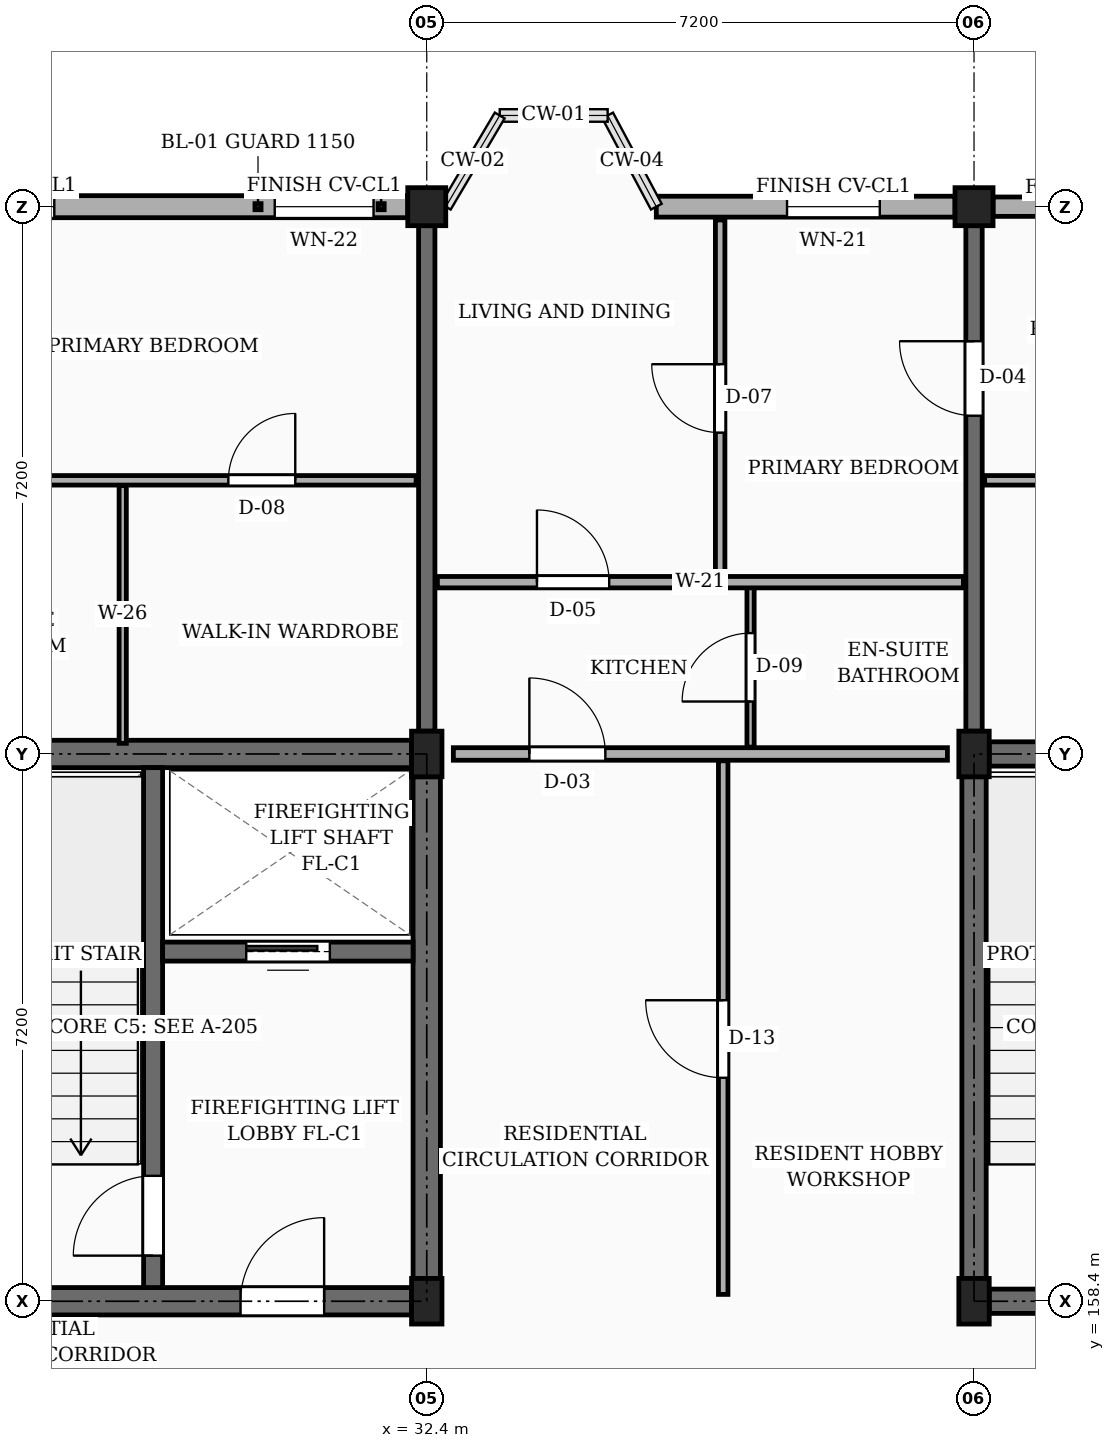
"""IFC4 building model, lengths in metres.
Left out: names, types, materials, properties, quantities, classifications, styles, units other than length and angle.
Written with IfcOpenShell. Run it as: python <this file> out.ifc"""

import sys

from ifc_helpers import new_model, si_unit, direction, frame, frame_2d, origin, origin_2d, place, context, subcontext, project, spatial, rectangle, extrude, element, fill, save


model = new_model("IFC4")
c1 = context("Model", 3, precision=1e-05, world=origin(), true_north=direction((0.0, 1.0)))
c2 = subcontext(c1, "Body", "Model", "MODEL_VIEW")
j1 = project(units=[si_unit("LENGTHUNIT", "METRE"), si_unit("PLANEANGLEUNIT", "RADIAN")], contexts=[c1])
p1 = place(None, origin())
s1 = spatial("IfcSite", under=j1, at=p1, CompositionType="ELEMENT")
p2 = place(p1, origin())
s2 = spatial("IfcBuilding", under=s1, at=p2, CompositionType="ELEMENT")
p3 = place(p2, frame((0.0, 0.0, 26.55)))
s3 = spatial("IfcBuildingStorey", under=s2, at=p3, CompositionType="ELEMENT", Elevation=26.55)
for number, where, z_axis, x_axis in (
    (1, (32.4, 158.4, 0.0), (0.0, 0.0, 1.0), (1.0, 0.0, 0.0)),
    (2, (32.4, 165.6, 0.0), (0.0, 0.0, 1.0), (1.0, 0.0, 0.0)),
):
    element("IfcColumn", number, at=place(p3, frame(where, z_axis=z_axis, x_axis=x_axis)), inside=s3, PredefinedType="COLUMN", context=c2, shape_type="SweptSolid", body=[
        extrude(rectangle(XDim=0.4, YDim=0.6, at=origin_2d()), origin(), (0.0, 0.0, 1.0), 3.15),
    ])
p4 = place(p3, frame((32.4, 172.8, 0.0), z_axis=(0.0, 0.0, 1.0), x_axis=(1.0, 0.0, 0.0)))
e3 = element("IfcColumn", 3, at=p4, inside=s3, PredefinedType="COLUMN", context=c2, shape_type="SweptSolid", body=[
    extrude(rectangle(XDim=0.5, YDim=0.5, at=origin_2d()), origin(), (0.0, 0.0, 1.0), 3.15),
])
for number, where, z_axis, x_axis in (
    (4, (39.6, 158.4, 0.0), (0.0, 0.0, 1.0), (1.0, 0.0, 0.0)),
    (5, (39.6, 165.6, 0.0), (0.0, 0.0, 1.0), (1.0, 0.0, 0.0)),
):
    element("IfcColumn", number, at=place(p3, frame(where, z_axis=z_axis, x_axis=x_axis)), inside=s3, PredefinedType="COLUMN", context=c2, shape_type="SweptSolid", body=[
        extrude(rectangle(XDim=0.4, YDim=0.6, at=origin_2d()), origin(), (0.0, 0.0, 1.0), 3.15),
    ])
p5 = place(p3, frame((39.6, 172.8, 0.0), z_axis=(0.0, 0.0, 1.0), x_axis=(1.0, 0.0, 0.0)))
e6 = element("IfcColumn", 6, at=p5, inside=s3, PredefinedType="COLUMN", context=c2, shape_type="SweptSolid", body=[
    extrude(rectangle(XDim=0.5, YDim=0.5, at=origin_2d()), origin(), (0.0, 0.0, 1.0), 3.15),
])
p6 = place(p3, frame((32.4, 165.9, 0.0), z_axis=(0.0, 0.0, 1.0), x_axis=(0.0, 1.0, 0.0)))
e7 = element("IfcWall", 7, at=p6, inside=s3, PredefinedType="SOLIDWALL", context=c2, shape_type="SweptSolid", body=[
    extrude(rectangle(XDim=6.65, YDim=0.215, at=frame_2d((3.325, 0.0))), origin(), (0.0, 0.0, 1.0), 2.185),
])
p7 = place(p3, frame((39.6, 165.9, 0.0), z_axis=(0.0, 0.0, 1.0), x_axis=(0.0, 1.0, 0.0)))
e8 = element("IfcWall", 8, at=p7, inside=s3, PredefinedType="SOLIDWALL", context=c2, shape_type="SweptSolid", body=[
    extrude(rectangle(XDim=6.65, YDim=0.215, at=frame_2d((3.325, 0.0))), origin(), (0.0, 0.0, 1.0), 2.185),
])
p8 = place(p7, frame((4.15, 0.0, 0.0)))
e9 = element("IfcOpeningElement", 9, at=p8, cuts=e8, PredefinedType="OPENING", context=c2, shape_type="SweptSolid", body=[
    extrude(rectangle(XDim=0.98, YDim=2.12, at=frame_2d((0.49, 1.06))), frame((0.0, 0.118, 0.0), z_axis=(0.0, -1.0, 0.0), x_axis=(1.0, 0.0, 0.0)), (0.0, 0.0, 1.0), 0.235),
])
p9 = place(p3, frame((46.55, 172.8, 0.0), z_axis=(0.0, 0.0, 1.0), x_axis=(-1.0, 0.0, 0.0)))
e10 = element("IfcWall", 10, at=p9, inside=s3, PredefinedType="SOLIDWALL", context=c2, shape_type="SweptSolid", body=[
    extrude(rectangle(XDim=6.7, YDim=0.255, at=frame_2d((3.35, 0.0))), origin(), (0.0, 0.0, 1.0), 2.455),
])
p10 = place(p9, frame((0.45, 0.0, 0.78)))
e11 = element("IfcOpeningElement", 11, at=p10, cuts=e10, PredefinedType="OPENING", context=c2, shape_type="SweptSolid", body=[
    extrude(rectangle(XDim=1.06, YDim=1.36, at=frame_2d((0.53, 0.68))), frame((0.0, 0.137, 0.0), z_axis=(0.0, -1.0, 0.0), x_axis=(1.0, 0.0, 0.0)), (0.0, 0.0, 1.0), 0.275),
])
p11 = place(p9, frame((4.65, 0.0, 0.78)))
e12 = element("IfcOpeningElement", 12, at=p11, cuts=e10, PredefinedType="OPENING", context=c2, shape_type="SweptSolid", body=[
    extrude(rectangle(XDim=1.22, YDim=1.36, at=frame_2d((0.61, 0.68))), frame((0.0, 0.137, 0.0), z_axis=(0.0, -1.0, 0.0), x_axis=(1.0, 0.0, 0.0)), (0.0, 0.0, 1.0), 0.275),
])
p12 = place(p3, frame((39.35, 172.8, 0.0), z_axis=(0.0, 0.0, 1.0), x_axis=(-1.0, 0.0, 0.0)))
e13 = element("IfcWall", 13, at=p12, inside=s3, PredefinedType="SOLIDWALL", context=c2, shape_type="SweptSolid", body=[
    extrude(rectangle(XDim=3.93, YDim=0.275, at=frame_2d((1.965, 0.0))), origin(), (0.0, 0.0, 1.0), 2.455),
])
p13 = place(p12, frame((0.99, 0.0, 0.78)))
e14 = element("IfcOpeningElement", 14, at=p13, cuts=e13, PredefinedType="OPENING", context=c2, shape_type="SweptSolid", body=[
    extrude(rectangle(XDim=1.22, YDim=1.36, at=frame_2d((0.61, 0.68))), frame((0.0, 0.147, 0.0), z_axis=(0.0, -1.0, 0.0), x_axis=(1.0, 0.0, 0.0)), (0.0, 0.0, 1.0), 0.295),
])
p14 = place(p3, frame((32.15, 172.8, 0.0), z_axis=(0.0, 0.0, 1.0), x_axis=(-1.0, 0.0, 0.0)))
e15 = element("IfcWall", 15, at=p14, inside=s3, PredefinedType="SOLIDWALL", context=c2, shape_type="SweptSolid", body=[
    extrude(rectangle(XDim=6.7, YDim=0.29, at=frame_2d((3.35, 0.0))), origin(), (0.0, 0.0, 1.0), 2.455),
])
p15 = place(p14, frame((0.45, 0.0, 0.78)))
e16 = element("IfcOpeningElement", 16, at=p15, cuts=e15, PredefinedType="OPENING", context=c2, shape_type="SweptSolid", body=[
    extrude(rectangle(XDim=1.3, YDim=1.36, at=frame_2d((0.65, 0.68))), frame((0.0, 0.155, 0.0), z_axis=(0.0, -1.0, 0.0), x_axis=(1.0, 0.0, 0.0)), (0.0, 0.0, 1.0), 0.31),
])
p16 = place(p14, frame((4.65, 0.0, 0.78)))
e17 = element("IfcOpeningElement", 17, at=p16, cuts=e15, PredefinedType="OPENING", context=c2, shape_type="SweptSolid", body=[
    extrude(rectangle(XDim=1.46, YDim=1.36, at=frame_2d((0.73, 0.68))), frame((0.0, 0.155, 0.0), z_axis=(0.0, -1.0, 0.0), x_axis=(1.0, 0.0, 0.0)), (0.0, 0.0, 1.0), 0.31),
])
p17 = place(p3, frame((25.4, 165.6, 0.0), z_axis=(0.0, 0.0, 1.0), x_axis=(1.0, 0.0, 0.0)))
e18 = element("IfcWall", 18, at=p17, inside=s3, PredefinedType="SHEAR", context=c2, shape_type="SweptSolid", body=[
    extrude(rectangle(XDim=6.8, YDim=0.36, at=frame_2d((3.4, 0.0))), origin(), (0.0, 0.0, 1.0), 2.885),
])
p18 = place(p3, frame((32.4, 158.7, 0.0), z_axis=(0.0, 0.0, 1.0), x_axis=(0.0, 1.0, 0.0)))
e19 = element("IfcWall", 19, at=p18, inside=s3, PredefinedType="SHEAR", context=c2, shape_type="SweptSolid", body=[
    extrude(rectangle(XDim=6.6, YDim=0.36, at=frame_2d((3.3, 0.0))), origin(), (0.0, 0.0, 1.0), 2.885),
])
p19 = place(p3, frame((25.4, 158.4, 0.0), z_axis=(0.0, 0.0, 1.0), x_axis=(1.0, 0.0, 0.0)))
e20 = element("IfcWall", 20, at=p19, inside=s3, PredefinedType="SHEAR", context=c2, shape_type="SweptSolid", body=[
    extrude(rectangle(XDim=6.8, YDim=0.36, at=frame_2d((3.4, 0.0))), origin(), (0.0, 0.0, 1.0), 2.885),
])
p20 = place(p19, frame((4.55, 0.0, 0.0)))
e21 = element("IfcOpeningElement", 21, at=p20, cuts=e20, PredefinedType="OPENING", context=c2, shape_type="SweptSolid", body=[
    extrude(rectangle(XDim=1.1, YDim=2.15, at=frame_2d((0.55, 1.075))), frame((0.0, 0.19, 0.0), z_axis=(0.0, -1.0, 0.0), x_axis=(1.0, 0.0, 0.0)), (0.0, 0.0, 1.0), 0.38),
])
p21 = place(p3, frame((28.8, 158.58, 0.0), z_axis=(0.0, 0.0, 1.0), x_axis=(0.0, 1.0, 0.0)))
e22 = element("IfcWall", 22, at=p21, inside=s3, PredefinedType="SHEAR", context=c2, shape_type="SweptSolid", body=[
    extrude(rectangle(XDim=6.84, YDim=0.25, at=frame_2d((3.42, 0.0))), origin(), (0.0, 0.0, 1.0), 2.885),
])
p22 = place(p21, frame((0.42, 0.0, 0.0)))
e23 = element("IfcOpeningElement", 23, at=p22, cuts=e22, PredefinedType="OPENING", context=c2, shape_type="SweptSolid", body=[
    extrude(rectangle(XDim=1.05, YDim=2.15, at=frame_2d((0.525, 1.075))), frame((0.0, 0.135, 0.0), z_axis=(0.0, -1.0, 0.0), x_axis=(1.0, 0.0, 0.0)), (0.0, 0.0, 1.0), 0.27),
])
p23 = place(p3, frame((28.925, 163.0, 0.0), z_axis=(0.0, 0.0, 1.0), x_axis=(1.0, 0.0, 0.0)))
e24 = element("IfcWall", 24, at=p23, inside=s3, PredefinedType="SHEAR", context=c2, shape_type="SweptSolid", body=[
    extrude(rectangle(XDim=3.295, YDim=0.25, at=frame_2d((1.647, 0.0))), origin(), (0.0, 0.0, 1.0), 2.885),
])
p24 = place(p23, frame((1.1, 0.0, 0.0)))
e25 = element("IfcOpeningElement", 25, at=p24, cuts=e24, PredefinedType="OPENING", context=c2, shape_type="SweptSolid", body=[
    extrude(rectangle(XDim=1.1, YDim=2.2, at=frame_2d((0.55, 1.1))), frame((0.0, 0.135, 0.0), z_axis=(0.0, -1.0, 0.0), x_axis=(1.0, 0.0, 0.0)), (0.0, 0.0, 1.0), 0.27),
])
p25 = place(p3, frame((39.6, 158.7, 0.0), z_axis=(0.0, 0.0, 1.0), x_axis=(0.0, 1.0, 0.0)))
e26 = element("IfcWall", 26, at=p25, inside=s3, PredefinedType="SHEAR", context=c2, shape_type="SweptSolid", body=[
    extrude(rectangle(XDim=6.6, YDim=0.32, at=frame_2d((3.3, 0.0))), origin(), (0.0, 0.0, 1.0), 2.885),
])
p26 = place(p3, frame((39.8, 165.6, 0.0), z_axis=(0.0, 0.0, 1.0), x_axis=(1.0, 0.0, 0.0)))
e27 = element("IfcWall", 27, at=p26, inside=s3, PredefinedType="SHEAR", context=c2, shape_type="SweptSolid", body=[
    extrude(rectangle(XDim=6.8, YDim=0.32, at=frame_2d((3.4, 0.0))), origin(), (0.0, 0.0, 1.0), 2.885),
])
p27 = place(p3, frame((39.8, 158.4, 0.0), z_axis=(0.0, 0.0, 1.0), x_axis=(1.0, 0.0, 0.0)))
e28 = element("IfcWall", 28, at=p27, inside=s3, PredefinedType="SHEAR", context=c2, shape_type="SweptSolid", body=[
    extrude(rectangle(XDim=6.8, YDim=0.32, at=frame_2d((3.4, 0.0))), origin(), (0.0, 0.0, 1.0), 2.885),
])
p28 = place(p27, frame((4.55, 0.0, 0.0)))
e29 = element("IfcOpeningElement", 29, at=p28, cuts=e28, PredefinedType="OPENING", context=c2, shape_type="SweptSolid", body=[
    extrude(rectangle(XDim=1.1, YDim=2.15, at=frame_2d((0.55, 1.075))), frame((0.0, 0.17, 0.0), z_axis=(0.0, -1.0, 0.0), x_axis=(1.0, 0.0, 0.0)), (0.0, 0.0, 1.0), 0.34),
])
p29 = place(p3, frame((32.75, 165.6, 0.0), z_axis=(0.0, 0.0, 1.0), x_axis=(1.0, 0.0, 0.0)))
e30 = element("IfcWall", 30, at=p29, inside=s3, PredefinedType="PARTITIONING", context=c2, shape_type="SweptSolid", body=[
    extrude(rectangle(XDim=6.5, YDim=0.165, at=frame_2d((3.25, 0.0))), origin(), (0.0, 0.0, 1.0), 2.32),
])
p30 = place(p29, frame((1.0, 0.0, 0.0)))
e31 = element("IfcOpeningElement", 31, at=p30, cuts=e30, PredefinedType="OPENING", context=c2, shape_type="SweptSolid", body=[
    extrude(rectangle(XDim=1.0, YDim=2.15, at=frame_2d((0.5, 1.075))), frame((0.0, 0.093, 0.0), z_axis=(0.0, -1.0, 0.0), x_axis=(1.0, 0.0, 0.0)), (0.0, 0.0, 1.0), 0.185),
])
p31 = place(p3, frame((25.34, 169.2, 0.0), z_axis=(0.0, 0.0, 1.0), x_axis=(1.0, 0.0, 0.0)))
e32 = element("IfcWall", 32, at=p31, inside=s3, PredefinedType="PARTITIONING", context=c2, shape_type="SweptSolid", body=[
    extrude(rectangle(XDim=6.92, YDim=0.125, at=frame_2d((3.46, 0.0))), origin(), (0.0, 0.0, 1.0), 2.32),
])
p32 = place(p31, frame((1.05, 0.0, 0.0)))
e33 = element("IfcOpeningElement", 33, at=p32, cuts=e32, PredefinedType="OPENING", context=c2, shape_type="SweptSolid", body=[
    extrude(rectangle(XDim=0.87, YDim=2.05, at=frame_2d((0.435, 1.025))), frame((0.0, 0.073, 0.0), z_axis=(0.0, -1.0, 0.0), x_axis=(1.0, 0.0, 0.0)), (0.0, 0.0, 1.0), 0.145),
])
p33 = place(p31, frame((4.45, 0.0, 0.0)))
e34 = element("IfcOpeningElement", 34, at=p33, cuts=e32, PredefinedType="OPENING", context=c2, shape_type="SweptSolid", body=[
    extrude(rectangle(XDim=0.88, YDim=2.08, at=frame_2d((0.44, 1.04))), frame((0.0, 0.073, 0.0), z_axis=(0.0, -1.0, 0.0), x_axis=(1.0, 0.0, 0.0)), (0.0, 0.0, 1.0), 0.145),
])
p34 = place(p3, frame((28.4, 165.74, 0.0), z_axis=(0.0, 0.0, 1.0), x_axis=(0.0, 1.0, 0.0)))
e35 = element("IfcWall", 35, at=p34, inside=s3, PredefinedType="PARTITIONING", context=c2, shape_type="SweptSolid", body=[
    extrude(rectangle(XDim=3.39, YDim=0.095, at=frame_2d((1.695, 0.0))), origin(), (0.0, 0.0, 1.0), 2.32),
])
p35 = place(p3, frame((36.3, 158.49, 0.0), z_axis=(0.0, 0.0, 1.0), x_axis=(0.0, 1.0, 0.0)))
e36 = element("IfcWall", 36, at=p35, inside=s3, PredefinedType="PARTITIONING", context=c2, shape_type="SweptSolid", body=[
    extrude(rectangle(XDim=7.02, YDim=0.125, at=frame_2d((3.51, 0.0))), origin(), (0.0, 0.0, 1.0), 2.32),
])
p36 = place(p35, frame((2.85, 0.0, 0.0)))
e37 = element("IfcOpeningElement", 37, at=p36, cuts=e36, PredefinedType="OPENING", context=c2, shape_type="SweptSolid", body=[
    extrude(rectangle(XDim=1.02, YDim=2.15, at=frame_2d((0.51, 1.075))), frame((0.0, 0.073, 0.0), z_axis=(0.0, -1.0, 0.0), x_axis=(1.0, 0.0, 0.0)), (0.0, 0.0, 1.0), 0.145),
])
p37 = place(p3, frame((36.26, 167.93, 0.0), z_axis=(0.0, 0.0, 1.0), x_axis=(0.0, 1.0, 0.0)))
e38 = element("IfcWall", 38, at=p37, inside=s3, PredefinedType="PARTITIONING", context=c2, shape_type="SweptSolid", body=[
    extrude(rectangle(XDim=4.695, YDim=0.125, at=frame_2d((2.348, 0.0))), origin(), (0.0, 0.0, 1.0), 2.32),
])
p38 = place(p37, frame((1.897, 0.0, 0.0)))
e39 = element("IfcOpeningElement", 39, at=p38, cuts=e38, PredefinedType="OPENING", context=c2, shape_type="SweptSolid", body=[
    extrude(rectangle(XDim=0.9, YDim=2.1, at=frame_2d((0.45, 1.05))), frame((0.0, 0.073, 0.0), z_axis=(0.0, -1.0, 0.0), x_axis=(1.0, 0.0, 0.0)), (0.0, 0.0, 1.0), 0.145),
])
p39 = place(p3, frame((36.66, 165.69, 0.0), z_axis=(0.0, 0.0, 1.0), x_axis=(0.0, 1.0, 0.0)))
e40 = element("IfcWall", 40, at=p39, inside=s3, PredefinedType="PARTITIONING", context=c2, shape_type="SweptSolid", body=[
    extrude(rectangle(XDim=2.1, YDim=0.095, at=frame_2d((1.05, 0.0))), origin(), (0.0, 0.0, 1.0), 2.32),
])
p40 = place(p39, frame((0.6, 0.0, 0.0)))
e41 = element("IfcOpeningElement", 41, at=p40, cuts=e40, PredefinedType="OPENING", context=c2, shape_type="SweptSolid", body=[
    extrude(rectangle(XDim=0.9, YDim=2.05, at=frame_2d((0.45, 1.025))), frame((0.0, 0.058, 0.0), z_axis=(0.0, -1.0, 0.0), x_axis=(1.0, 0.0, 0.0)), (0.0, 0.0, 1.0), 0.115),
])
p41 = place(p3, frame((32.54, 167.86, 0.0), z_axis=(0.0, 0.0, 1.0), x_axis=(1.0, 0.0, 0.0)))
e42 = element("IfcWall", 42, at=p41, inside=s3, PredefinedType="PARTITIONING", context=c2, shape_type="SweptSolid", body=[
    extrude(rectangle(XDim=6.92, YDim=0.15, at=frame_2d((3.46, 0.0))), origin(), (0.0, 0.0, 1.0), 2.32),
])
p42 = place(p41, frame((1.31, 0.0, 0.0)))
e43 = element("IfcOpeningElement", 43, at=p42, cuts=e42, PredefinedType="OPENING", context=c2, shape_type="SweptSolid", body=[
    extrude(rectangle(XDim=0.95, YDim=2.1, at=frame_2d((0.475, 1.05))), frame((0.0, 0.085, 0.0), z_axis=(0.0, -1.0, 0.0), x_axis=(1.0, 0.0, 0.0)), (0.0, 0.0, 1.0), 0.17),
])
p43 = place(p3, frame((39.74, 169.2, 0.0), z_axis=(0.0, 0.0, 1.0), x_axis=(1.0, 0.0, 0.0)))
e44 = element("IfcWall", 44, at=p43, inside=s3, PredefinedType="PARTITIONING", context=c2, shape_type="SweptSolid", body=[
    extrude(rectangle(XDim=6.92, YDim=0.125, at=frame_2d((3.46, 0.0))), origin(), (0.0, 0.0, 1.0), 2.32),
])
p44 = place(p43, frame((1.05, 0.0, 0.0)))
e45 = element("IfcOpeningElement", 45, at=p44, cuts=e44, PredefinedType="OPENING", context=c2, shape_type="SweptSolid", body=[
    extrude(rectangle(XDim=0.87, YDim=2.05, at=frame_2d((0.435, 1.025))), frame((0.0, 0.073, 0.0), z_axis=(0.0, -1.0, 0.0), x_axis=(1.0, 0.0, 0.0)), (0.0, 0.0, 1.0), 0.145),
])
p45 = place(p43, frame((4.45, 0.0, 0.0)))
e46 = element("IfcOpeningElement", 46, at=p45, cuts=e44, PredefinedType="OPENING", context=c2, shape_type="SweptSolid", body=[
    extrude(rectangle(XDim=0.88, YDim=2.08, at=frame_2d((0.44, 1.04))), frame((0.0, 0.073, 0.0), z_axis=(0.0, -1.0, 0.0), x_axis=(1.0, 0.0, 0.0)), (0.0, 0.0, 1.0), 0.145),
])
p46 = place(p13, origin())
e47 = element("IfcWindow", 47, at=p46, inside=s3, PartitioningType="SINGLE_PANEL", PredefinedType="WINDOW", context=c2, shape_type="SweptSolid", body=[
    extrude(rectangle(XDim=1.22, YDim=1.36, at=frame_2d((0.61, 0.68))), frame((0.0, 0.03, 0.0), z_axis=(0.0, -1.0, 0.0), x_axis=(1.0, 0.0, 0.0)), (0.0, 0.0, 1.0), 0.06),
])
fill(e14, e47)
p47 = place(p15, origin())
e48 = element("IfcWindow", 48, at=p47, inside=s3, PartitioningType="SINGLE_PANEL", PredefinedType="WINDOW", context=c2, shape_type="SweptSolid", body=[
    extrude(rectangle(XDim=1.3, YDim=1.36, at=frame_2d((0.65, 0.68))), frame((0.0, 0.03, 0.0), z_axis=(0.0, -1.0, 0.0), x_axis=(1.0, 0.0, 0.0)), (0.0, 0.0, 1.0), 0.06),
])
fill(e16, e48)
p48 = place(p16, origin())
e49 = element("IfcWindow", 49, at=p48, inside=s3, PartitioningType="SINGLE_PANEL", PredefinedType="WINDOW", context=c2, shape_type="SweptSolid", body=[
    extrude(rectangle(XDim=1.46, YDim=1.36, at=frame_2d((0.73, 0.68))), frame((0.0, 0.03, 0.0), z_axis=(0.0, -1.0, 0.0), x_axis=(1.0, 0.0, 0.0)), (0.0, 0.0, 1.0), 0.06),
])
fill(e17, e49)
p49 = place(p20, frame((1.1, 0.0, 0.0), z_axis=(0.0, 0.0, 1.0), x_axis=(-1.0, 0.0, 0.0)))
e50 = element("IfcDoor", 50, at=p49, inside=s3, OperationType="SINGLE_SWING_RIGHT", PredefinedType="DOOR", context=c2, shape_type="SweptSolid", body=[
    extrude(rectangle(XDim=1.1, YDim=2.15, at=frame_2d((0.55, 1.075))), frame((0.0, 0.025, 0.0), z_axis=(0.0, -1.0, 0.0), x_axis=(1.0, 0.0, 0.0)), (0.0, 0.0, 1.0), 0.05),
])
fill(e21, e50)
p50 = place(p22, origin())
e51 = element("IfcDoor", 51, at=p50, inside=s3, OperationType="SINGLE_SWING_LEFT", PredefinedType="DOOR", context=c2, shape_type="SweptSolid", body=[
    extrude(rectangle(XDim=1.05, YDim=2.15, at=frame_2d((0.525, 1.075))), frame((0.0, 0.025, 0.0), z_axis=(0.0, -1.0, 0.0), x_axis=(1.0, 0.0, 0.0)), (0.0, 0.0, 1.0), 0.05),
])
fill(e23, e51)
p51 = place(p24, origin())
e52 = element("IfcDoor", 52, at=p51, inside=s3, OperationType="SLIDING_TO_LEFT", PredefinedType="DOOR", context=c2, shape_type="SweptSolid", body=[
    extrude(rectangle(XDim=1.1, YDim=2.2, at=frame_2d((0.55, 1.1))), frame((0.0, 0.025, 0.0), z_axis=(0.0, -1.0, 0.0), x_axis=(1.0, 0.0, 0.0)), (0.0, 0.0, 1.0), 0.05),
])
fill(e25, e52)
p52 = place(p30, origin())
e53 = element("IfcDoor", 53, at=p52, inside=s3, OperationType="SINGLE_SWING_LEFT", PredefinedType="DOOR", context=c2, shape_type="SweptSolid", body=[
    extrude(rectangle(XDim=1.0, YDim=2.15, at=frame_2d((0.5, 1.075))), frame((0.0, 0.025, 0.0), z_axis=(0.0, -1.0, 0.0), x_axis=(1.0, 0.0, 0.0)), (0.0, 0.0, 1.0), 0.05),
])
fill(e31, e53)
p53 = place(p33, origin())
e54 = element("IfcDoor", 54, at=p53, inside=s3, OperationType="SINGLE_SWING_RIGHT", PredefinedType="DOOR", context=c2, shape_type="SweptSolid", body=[
    extrude(rectangle(XDim=0.88, YDim=2.08, at=frame_2d((0.44, 1.04))), frame((0.0, 0.025, 0.0), z_axis=(0.0, -1.0, 0.0), x_axis=(1.0, 0.0, 0.0)), (0.0, 0.0, 1.0), 0.05),
])
fill(e34, e54)
p54 = place(p36, origin())
e55 = element("IfcDoor", 55, at=p54, inside=s3, OperationType="SINGLE_SWING_RIGHT", PredefinedType="DOOR", context=c2, shape_type="SweptSolid", body=[
    extrude(rectangle(XDim=1.02, YDim=2.15, at=frame_2d((0.51, 1.075))), frame((0.0, 0.025, 0.0), z_axis=(0.0, -1.0, 0.0), x_axis=(1.0, 0.0, 0.0)), (0.0, 0.0, 1.0), 0.05),
])
fill(e37, e55)
p55 = place(p38, origin())
e56 = element("IfcDoor", 56, at=p55, inside=s3, OperationType="SINGLE_SWING_RIGHT", PredefinedType="DOOR", context=c2, shape_type="SweptSolid", body=[
    extrude(rectangle(XDim=0.9, YDim=2.1, at=frame_2d((0.45, 1.05))), frame((0.0, 0.025, 0.0), z_axis=(0.0, -1.0, 0.0), x_axis=(1.0, 0.0, 0.0)), (0.0, 0.0, 1.0), 0.05),
])
fill(e39, e56)
p56 = place(p40, origin())
e57 = element("IfcDoor", 57, at=p56, inside=s3, OperationType="SINGLE_SWING_LEFT", PredefinedType="DOOR", context=c2, shape_type="SweptSolid", body=[
    extrude(rectangle(XDim=0.9, YDim=2.05, at=frame_2d((0.45, 1.025))), frame((0.0, 0.025, 0.0), z_axis=(0.0, -1.0, 0.0), x_axis=(1.0, 0.0, 0.0)), (0.0, 0.0, 1.0), 0.05),
])
fill(e41, e57)
p57 = place(p42, origin())
e58 = element("IfcDoor", 58, at=p57, inside=s3, OperationType="SINGLE_SWING_LEFT", PredefinedType="DOOR", context=c2, shape_type="SweptSolid", body=[
    extrude(rectangle(XDim=0.95, YDim=2.1, at=frame_2d((0.475, 1.05))), frame((0.0, 0.025, 0.0), z_axis=(0.0, -1.0, 0.0), x_axis=(1.0, 0.0, 0.0)), (0.0, 0.0, 1.0), 0.05),
])
fill(e43, e58)
p58 = place(p8, origin())
e59 = element("IfcDoor", 59, at=p58, inside=s3, OperationType="SINGLE_SWING_RIGHT", PredefinedType="DOOR", context=c2, shape_type="SweptSolid", body=[
    extrude(rectangle(XDim=0.98, YDim=2.12, at=frame_2d((0.49, 1.06))), frame((0.0, 0.025, 0.0), z_axis=(0.0, -1.0, 0.0), x_axis=(1.0, 0.0, 0.0)), (0.0, 0.0, 1.0), 0.05),
])
fill(e9, e59)
save(model, sys.argv[1])
